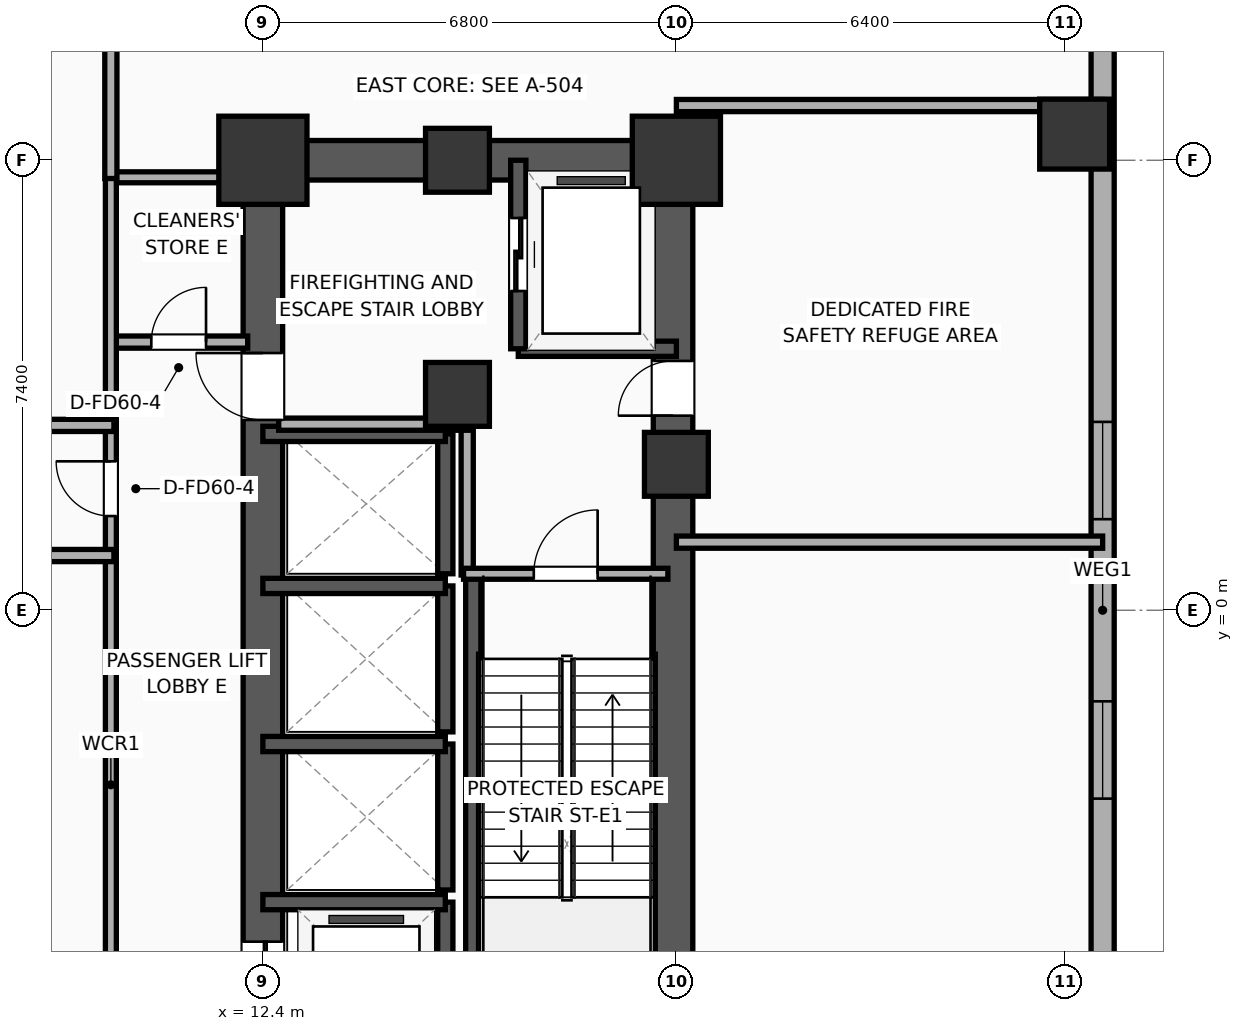
"""IFC4 building model, lengths in metres.
Left out: names, types, materials, properties, quantities, classifications, styles, units other than length and angle.
Written with IfcOpenShell. Run it as: python <this file> out.ifc"""

import sys

from ifc_helpers import new_model, si_unit, direction, frame, frame_2d, origin, origin_2d, place, context, subcontext, project, spatial, rectangle, hollow_rectangle, extrude, element, fill, save


model = new_model("IFC4")
c1 = context("Model", 3, precision=1e-05, world=origin(), true_north=direction((0.0, 1.0)))
c2 = subcontext(c1, "Body", "Model", "MODEL_VIEW")
j1 = project(units=[si_unit("LENGTHUNIT", "METRE"), si_unit("PLANEANGLEUNIT", "RADIAN")], contexts=[c1])
p1 = place(None, origin())
s1 = spatial("IfcSite", under=j1, at=p1, CompositionType="ELEMENT")
p2 = place(p1, origin())
s2 = spatial("IfcBuilding", under=s1, at=p2, CompositionType="ELEMENT")
p3 = place(p2, frame((0.0, 0.0, 80.6)))
s3 = spatial("IfcBuildingStorey", under=s2, at=p3, CompositionType="ELEMENT", Elevation=80.6)
p4 = place(p3, frame((15.6, 3.55, 0.0), z_axis=(0.0, 0.0, 1.0), x_axis=(1.0, 0.0, 0.0)))
e1 = element("IfcColumn", 1, at=p4, inside=s3, PredefinedType="COLUMN", context=c2, shape_type="SweptSolid", body=[
    extrude(rectangle(XDim=1.05, YDim=1.05, at=origin_2d()), origin(), (0.0, 0.0, 1.0), 5.2),
])
p5 = place(p3, frame((12.4, 7.4, 0.0), z_axis=(0.0, 0.0, 1.0), x_axis=(1.0, 0.0, 0.0)))
e2 = element("IfcColumn", 2, at=p5, inside=s3, PredefinedType="COLUMN", context=c2, shape_type="SweptSolid", body=[
    extrude(rectangle(XDim=1.45, YDim=1.45, at=origin_2d()), origin(), (0.0, 0.0, 1.0), 5.2),
])
for number, where, z_axis, x_axis in (
    (3, (15.6, 7.4, 0.0), (0.0, 0.0, 1.0), (1.0, 0.0, 0.0)),
    (4, (19.2, 2.4, 0.0), (0.0, 0.0, 1.0), (1.0, 0.0, 0.0)),
):
    element("IfcColumn", number, at=place(p3, frame(where, z_axis=z_axis, x_axis=x_axis)), inside=s3, PredefinedType="COLUMN", context=c2, shape_type="SweptSolid", body=[
        extrude(rectangle(XDim=1.05, YDim=1.05, at=origin_2d()), origin(), (0.0, 0.0, 1.0), 5.2),
    ])
p6 = place(p3, frame((19.2, 7.4, 0.0), z_axis=(0.0, 0.0, 1.0), x_axis=(1.0, 0.0, 0.0)))
e5 = element("IfcColumn", 5, at=p6, inside=s3, PredefinedType="COLUMN", context=c2, shape_type="SweptSolid", body=[
    extrude(rectangle(XDim=1.45, YDim=1.45, at=origin_2d()), origin(), (0.0, 0.0, 1.0), 5.2),
])
p7 = place(p3, frame((12.075, 7.4, 0.0), z_axis=(0.0, 0.0, 1.0), x_axis=(1.0, 0.0, 0.0)))
e6 = element("IfcWall", 6, at=p7, inside=s3, PredefinedType="SHEAR", context=c2, shape_type="SweptSolid", body=[
    extrude(rectangle(XDim=7.45, YDim=0.65, at=frame_2d((3.725, 0.0))), origin(), (0.0, 0.0, 1.0), 4.8),
])
p8 = place(p3, frame((12.4, -7.4, 0.0), z_axis=(0.0, 0.0, 1.0), x_axis=(0.0, 1.0, 0.0)))
e7 = element("IfcWall", 7, at=p8, inside=s3, PredefinedType="SHEAR", context=c2, shape_type="SweptSolid", body=[
    extrude(rectangle(XDim=14.8, YDim=0.65, at=frame_2d((7.4, 0.0))), origin(), (0.0, 0.0, 1.0), 4.8),
])
p9 = place(p8, frame((0.85, 0.0, 0.0)))
e8 = element("IfcOpeningElement", 8, at=p9, cuts=e7, PredefinedType="OPENING", context=c2, shape_type="SweptSolid", body=[
    extrude(rectangle(XDim=1.1, YDim=2.05, at=frame_2d((0.55, 1.025))), frame((0.0, 0.335, 0.0), z_axis=(0.0, -1.0, 0.0), x_axis=(1.0, 0.0, 0.0)), (0.0, 0.0, 1.0), 0.67),
])
p10 = place(p8, frame((10.53, 0.0, 0.0)))
e9 = element("IfcOpeningElement", 9, at=p10, cuts=e7, PredefinedType="OPENING", context=c2, shape_type="SweptSolid", body=[
    extrude(rectangle(XDim=1.1, YDim=2.05, at=frame_2d((0.55, 1.025))), frame((0.0, 0.335, 0.0), z_axis=(0.0, -1.0, 0.0), x_axis=(1.0, 0.0, 0.0)), (0.0, 0.0, 1.0), 0.67),
])
p11 = place(p3, frame((19.145, -7.4, 0.0), z_axis=(0.0, 0.0, 1.0), x_axis=(0.0, 1.0, 0.0)))
e10 = element("IfcWall", 10, at=p11, inside=s3, PredefinedType="SHEAR", context=c2, shape_type="SweptSolid", body=[
    extrude(rectangle(XDim=14.8, YDim=0.65, at=frame_2d((7.4, 0.0))), origin(), (0.0, 0.0, 1.0), 4.8),
])
p12 = place(p11, frame((10.6, 0.0, 0.0)))
e11 = element("IfcOpeningElement", 11, at=p12, cuts=e10, PredefinedType="OPENING", context=c2, shape_type="SweptSolid", body=[
    extrude(rectangle(XDim=0.9, YDim=2.05, at=frame_2d((0.45, 1.025))), frame((0.0, 0.335, 0.0), z_axis=(0.0, -1.0, 0.0), x_axis=(1.0, 0.0, 0.0)), (0.0, 0.0, 1.0), 0.67),
])
p13 = place(p3, frame((15.86, -7.085, 0.0), z_axis=(0.0, 0.0, 1.0), x_axis=(0.0, 1.0, 0.0)))
e12 = element("IfcWall", 12, at=p13, inside=s3, PredefinedType="SOLIDWALL", context=c2, shape_type="SweptSolid", body=[
    extrude(rectangle(XDim=7.685, YDim=0.25, at=frame_2d((3.843, 0.0))), origin(), (0.0, 0.0, 1.0), 4.8),
])
p14 = place(p3, frame((25.75, 7.83, 0.0), z_axis=(0.0, 0.0, 1.0), x_axis=(1.0, 0.0, 0.0)))
e13 = element("IfcColumn", 13, at=p14, inside=s3, PredefinedType="COLUMN", context=c2, shape_type="SweptSolid", body=[
    extrude(hollow_rectangle(XDim=1.15, YDim=1.15, WallThickness=0.04, at=origin_2d()), origin(), (0.0, 0.0, 1.0), 5.165),
])
p15 = place(p3, frame((26.21, 18.381, 0.0), z_axis=(0.0, 0.0, 1.0), x_axis=(0.0, -1.0, 0.0)))
e14 = element("IfcWall", 14, at=p15, inside=s3, PredefinedType="ELEMENTEDWALL", context=c2, shape_type="SweptSolid", body=[
    extrude(rectangle(XDim=36.763, YDim=0.38, at=frame_2d((18.381, 0.0))), origin(), (0.0, 0.0, 1.0), 3.69),
])
p16 = place(p15, frame((1.498, 0.0, 0.75)))
e15 = element("IfcOpeningElement", 15, at=p16, cuts=e14, PredefinedType="OPENING", context=c2, shape_type="SweptSolid", body=[
    extrude(rectangle(XDim=1.6, YDim=1.4, at=frame_2d((0.8, 0.7))), frame((0.0, 0.2, 0.0), z_axis=(0.0, -1.0, 0.0), x_axis=(1.0, 0.0, 0.0)), (0.0, 0.0, 1.0), 0.4),
])
p17 = place(p15, frame((6.093, 0.0, 0.75)))
e16 = element("IfcOpeningElement", 16, at=p17, cuts=e14, PredefinedType="OPENING", context=c2, shape_type="SweptSolid", body=[
    extrude(rectangle(XDim=1.6, YDim=1.4, at=frame_2d((0.8, 0.7))), frame((0.0, 0.2, 0.0), z_axis=(0.0, -1.0, 0.0), x_axis=(1.0, 0.0, 0.0)), (0.0, 0.0, 1.0), 0.4),
])
p18 = place(p15, frame((15.284, 0.0, 0.75)))
e17 = element("IfcOpeningElement", 17, at=p18, cuts=e14, PredefinedType="OPENING", context=c2, shape_type="SweptSolid", body=[
    extrude(rectangle(XDim=1.6, YDim=1.4, at=frame_2d((0.8, 0.7))), frame((0.0, 0.2, 0.0), z_axis=(0.0, -1.0, 0.0), x_axis=(1.0, 0.0, 0.0)), (0.0, 0.0, 1.0), 0.4),
])
p19 = place(p15, frame((19.879, 0.0, 0.75)))
e18 = element("IfcOpeningElement", 18, at=p19, cuts=e14, PredefinedType="OPENING", context=c2, shape_type="SweptSolid", body=[
    extrude(rectangle(XDim=1.6, YDim=1.4, at=frame_2d((0.8, 0.7))), frame((0.0, 0.2, 0.0), z_axis=(0.0, -1.0, 0.0), x_axis=(1.0, 0.0, 0.0)), (0.0, 0.0, 1.0), 0.4),
])
p20 = place(p15, frame((29.07, 0.0, 0.75)))
e19 = element("IfcOpeningElement", 19, at=p20, cuts=e14, PredefinedType="OPENING", context=c2, shape_type="SweptSolid", body=[
    extrude(rectangle(XDim=1.6, YDim=1.4, at=frame_2d((0.8, 0.7))), frame((0.0, 0.2, 0.0), z_axis=(0.0, -1.0, 0.0), x_axis=(1.0, 0.0, 0.0)), (0.0, 0.0, 1.0), 0.4),
])
p21 = place(p15, frame((33.665, 0.0, 0.75)))
e20 = element("IfcOpeningElement", 20, at=p21, cuts=e14, PredefinedType="OPENING", context=c2, shape_type="SweptSolid", body=[
    extrude(rectangle(XDim=1.6, YDim=1.4, at=frame_2d((0.8, 0.7))), frame((0.0, 0.2, 0.0), z_axis=(0.0, -1.0, 0.0), x_axis=(1.0, 0.0, 0.0)), (0.0, 0.0, 1.0), 0.4),
])
p22 = place(p3, frame((16.6, 4.3, 0.0), z_axis=(0.0, 0.0, 1.0), x_axis=(1.0, 0.0, 0.0)))
e21 = element("IfcWall", 21, at=p22, inside=s3, PredefinedType="SOLIDWALL", context=c2, shape_type="SweptSolid", body=[
    extrude(rectangle(XDim=2.6, YDim=0.25, at=frame_2d((1.3, 0.0))), origin(), (0.0, 0.0, 1.0), 4.8),
])
p23 = place(p3, frame((16.6, 7.4, 0.0), z_axis=(0.0, 0.0, 1.0), x_axis=(0.0, -1.0, 0.0)))
e22 = element("IfcWall", 22, at=p23, inside=s3, PredefinedType="SOLIDWALL", context=c2, shape_type="SweptSolid", body=[
    extrude(rectangle(XDim=3.1, YDim=0.25, at=frame_2d((1.55, 0.0))), origin(), (0.0, 0.0, 1.0), 4.8),
])
p24 = place(p23, frame((0.95, 0.0, 0.0)))
e23 = element("IfcOpeningElement", 23, at=p24, cuts=e22, PredefinedType="OPENING", context=c2, shape_type="SweptSolid", body=[
    extrude(rectangle(XDim=1.2, YDim=2.05, at=frame_2d((0.6, 1.025))), frame((0.0, 0.135, 0.0), z_axis=(0.0, -1.0, 0.0), x_axis=(1.0, 0.0, 0.0)), (0.0, 0.0, 1.0), 0.27),
])
p25 = place(p3, frame((15.4, -7.4, 0.0), z_axis=(0.0, 0.0, 1.0), x_axis=(0.0, 1.0, 0.0)))
e24 = element("IfcWall", 24, at=p25, inside=s3, PredefinedType="SOLIDWALL", context=c2, shape_type="SweptSolid", body=[
    extrude(rectangle(XDim=2.6, YDim=0.25, at=frame_2d((1.3, 0.0))), origin(), (0.0, 0.0, 1.0), 4.8),
])
p26 = place(p3, frame((15.4, -4.8, 0.0), z_axis=(0.0, 0.0, 1.0), x_axis=(-1.0, 0.0, 0.0)))
e25 = element("IfcWall", 25, at=p26, inside=s3, PredefinedType="SOLIDWALL", context=c2, shape_type="SweptSolid", body=[
    extrude(rectangle(XDim=3.0, YDim=0.25, at=frame_2d((1.5, 0.0))), origin(), (0.0, 0.0, 1.0), 4.8),
])
p27 = place(p3, frame((15.4, -4.6, 0.0), z_axis=(0.0, 0.0, 1.0), x_axis=(0.0, 1.0, 0.0)))
e26 = element("IfcWall", 26, at=p27, inside=s3, PredefinedType="SOLIDWALL", context=c2, shape_type="SweptSolid", body=[
    extrude(rectangle(XDim=2.4, YDim=0.25, at=frame_2d((1.2, 0.0))), origin(), (0.0, 0.0, 1.0), 4.8),
])
p28 = place(p3, frame((15.4, -2.2, 0.0), z_axis=(0.0, 0.0, 1.0), x_axis=(-1.0, 0.0, 0.0)))
e27 = element("IfcWall", 27, at=p28, inside=s3, PredefinedType="SOLIDWALL", context=c2, shape_type="SweptSolid", body=[
    extrude(rectangle(XDim=3.0, YDim=0.25, at=frame_2d((1.5, 0.0))), origin(), (0.0, 0.0, 1.0), 4.8),
])
p29 = place(p3, frame((15.4, -2.0, 0.0), z_axis=(0.0, 0.0, 1.0), x_axis=(0.0, 1.0, 0.0)))
e28 = element("IfcWall", 28, at=p29, inside=s3, PredefinedType="SOLIDWALL", context=c2, shape_type="SweptSolid", body=[
    extrude(rectangle(XDim=2.4, YDim=0.25, at=frame_2d((1.2, 0.0))), origin(), (0.0, 0.0, 1.0), 4.8),
])
p30 = place(p3, frame((15.4, 0.4, 0.0), z_axis=(0.0, 0.0, 1.0), x_axis=(-1.0, 0.0, 0.0)))
e29 = element("IfcWall", 29, at=p30, inside=s3, PredefinedType="SOLIDWALL", context=c2, shape_type="SweptSolid", body=[
    extrude(rectangle(XDim=3.0, YDim=0.25, at=frame_2d((1.5, 0.0))), origin(), (0.0, 0.0, 1.0), 4.8),
])
p31 = place(p3, frame((15.4, 0.6, 0.0), z_axis=(0.0, 0.0, 1.0), x_axis=(0.0, 1.0, 0.0)))
e30 = element("IfcWall", 30, at=p31, inside=s3, PredefinedType="SOLIDWALL", context=c2, shape_type="SweptSolid", body=[
    extrude(rectangle(XDim=2.3, YDim=0.25, at=frame_2d((1.15, 0.0))), origin(), (0.0, 0.0, 1.0), 4.8),
])
p32 = place(p3, frame((15.4, 2.9, 0.0), z_axis=(0.0, 0.0, 1.0), x_axis=(-1.0, 0.0, 0.0)))
e31 = element("IfcWall", 31, at=p32, inside=s3, PredefinedType="SOLIDWALL", context=c2, shape_type="SweptSolid", body=[
    extrude(rectangle(XDim=3.0, YDim=0.25, at=frame_2d((1.5, 0.0))), origin(), (0.0, 0.0, 1.0), 4.8),
])
p33 = place(p3, frame((15.76, 0.58, 0.0), z_axis=(0.0, 0.0, 1.0), x_axis=(0.0, 1.0, 0.0)))
e32 = element("IfcWall", 32, at=p33, inside=s3, PredefinedType="PARTITIONING", context=c2, shape_type="SweptSolid", body=[
    extrude(rectangle(XDim=2.52, YDim=0.2, at=frame_2d((1.26, 0.0))), origin(), (0.0, 0.0, 1.0), 4.8),
])
p34 = place(p3, frame((12.66, 3.06, 0.0), z_axis=(0.0, 0.0, 1.0), x_axis=(1.0, 0.0, 0.0)))
e33 = element("IfcWall", 33, at=p34, inside=s3, PredefinedType="PARTITIONING", context=c2, shape_type="SweptSolid", body=[
    extrude(rectangle(XDim=3.16, YDim=0.2, at=frame_2d((1.58, 0.0))), origin(), (0.0, 0.0, 1.0), 4.8),
])
p35 = place(p3, frame((15.7, 0.6, 0.0), z_axis=(0.0, 0.0, 1.0), x_axis=(1.0, 0.0, 0.0)))
e34 = element("IfcWall", 34, at=p35, inside=s3, PredefinedType="PARTITIONING", context=c2, shape_type="SweptSolid", body=[
    extrude(rectangle(XDim=3.36, YDim=0.18, at=frame_2d((1.68, 0.0))), origin(), (0.0, 0.0, 1.0), 4.8),
])
p36 = place(p35, frame((1.155, 0.0, 0.0)))
e35 = element("IfcOpeningElement", 35, at=p36, cuts=e34, PredefinedType="OPENING", context=c2, shape_type="SweptSolid", body=[
    extrude(rectangle(XDim=1.05, YDim=2.05, at=frame_2d((0.525, 1.025))), frame((0.0, 0.1, 0.0), z_axis=(0.0, -1.0, 0.0), x_axis=(1.0, 0.0, 0.0)), (0.0, 0.0, 1.0), 0.2),
])
p37 = place(p3, frame((9.88, 4.41, 0.0), z_axis=(0.0, 0.0, 1.0), x_axis=(1.0, 0.0, 0.0)))
e36 = element("IfcWall", 36, at=p37, inside=s3, PredefinedType="PARTITIONING", context=c2, shape_type="SweptSolid", body=[
    extrude(rectangle(XDim=2.27, YDim=0.2, at=frame_2d((1.135, 0.0))), origin(), (0.0, 0.0, 1.0), 4.8),
])
p38 = place(p37, frame((0.685, 0.0, 0.0)))
e37 = element("IfcOpeningElement", 37, at=p38, cuts=e36, PredefinedType="OPENING", context=c2, shape_type="SweptSolid", body=[
    extrude(rectangle(XDim=0.9, YDim=2.05, at=frame_2d((0.45, 1.025))), frame((0.0, 0.11, 0.0), z_axis=(0.0, -1.0, 0.0), x_axis=(1.0, 0.0, 0.0)), (0.0, 0.0, 1.0), 0.22),
])
p39 = place(p3, frame((9.88, 7.12, 0.0), z_axis=(0.0, 0.0, 1.0), x_axis=(1.0, 0.0, 0.0)))
e38 = element("IfcWall", 38, at=p39, inside=s3, PredefinedType="PARTITIONING", context=c2, shape_type="SweptSolid", body=[
    extrude(rectangle(XDim=2.27, YDim=0.18, at=frame_2d((1.135, 0.0))), origin(), (0.0, 0.0, 1.0), 3.84),
])
p40 = place(p3, frame((9.9, -7.14, 0.0), z_axis=(0.0, 0.0, 1.0), x_axis=(0.0, 1.0, 0.0)))
e39 = element("IfcWall", 39, at=p40, inside=s3, PredefinedType="PARTITIONING", context=c2, shape_type="SweptSolid", body=[
    extrude(rectangle(XDim=14.28, YDim=0.18, at=frame_2d((7.14, 0.0))), origin(), (0.0, 0.0, 1.0), 4.8),
])
p41 = place(p40, frame((8.689, 0.0, 0.0)))
e40 = element("IfcOpeningElement", 40, at=p41, cuts=e39, PredefinedType="OPENING", context=c2, shape_type="SweptSolid", body=[
    extrude(rectangle(XDim=0.9, YDim=2.05, at=frame_2d((0.45, 1.025))), frame((0.0, 0.1, 0.0), z_axis=(0.0, -1.0, 0.0), x_axis=(1.0, 0.0, 0.0)), (0.0, 0.0, 1.0), 0.2),
])
p42 = place(p3, frame((-9.95, 3.04, 0.0), z_axis=(0.0, 0.0, 1.0), x_axis=(1.0, 0.0, 0.0)))
e41 = element("IfcWall", 41, at=p42, inside=s3, PredefinedType="PARTITIONING", context=c2, shape_type="SweptSolid", body=[
    extrude(rectangle(XDim=19.9, YDim=0.2, at=frame_2d((9.95, 0.0))), origin(), (0.0, 0.0, 1.0), 4.8),
])
p43 = place(p42, frame((9.425, 0.0, 0.0)))
e42 = element("IfcOpeningElement", 42, at=p43, cuts=e41, PredefinedType="OPENING", context=c2, shape_type="SweptSolid", body=[
    extrude(rectangle(XDim=1.05, YDim=2.05, at=frame_2d((0.525, 1.025))), frame((0.0, 0.11, 0.0), z_axis=(0.0, -1.0, 0.0), x_axis=(1.0, 0.0, 0.0)), (0.0, 0.0, 1.0), 0.22),
])
p44 = place(p3, frame((-9.95, 0.9, 0.0), z_axis=(0.0, 0.0, 1.0), x_axis=(1.0, 0.0, 0.0)))
e43 = element("IfcWall", 43, at=p44, inside=s3, PredefinedType="PARTITIONING", context=c2, shape_type="SweptSolid", body=[
    extrude(rectangle(XDim=19.9, YDim=0.2, at=frame_2d((9.95, 0.0))), origin(), (0.0, 0.0, 1.0), 4.8),
])
p45 = place(p44, frame((9.425, 0.0, 0.0)))
e44 = element("IfcOpeningElement", 44, at=p45, cuts=e43, PredefinedType="OPENING", context=c2, shape_type="SweptSolid", body=[
    extrude(rectangle(XDim=1.05, YDim=2.05, at=frame_2d((0.525, 1.025))), frame((0.0, 0.11, 0.0), z_axis=(0.0, -1.0, 0.0), x_axis=(1.0, 0.0, 0.0)), (0.0, 0.0, 1.0), 0.22),
])
p46 = place(p3, frame((19.2, 1.12, 0.0), z_axis=(0.0, 0.0, 1.0), x_axis=(1.0, 0.0, 0.0)))
e45 = element("IfcWall", 45, at=p46, inside=s3, PredefinedType="PARTITIONING", context=c2, shape_type="SweptSolid", body=[
    extrude(rectangle(XDim=7.01, YDim=0.2, at=frame_2d((3.505, 0.0))), origin(), (0.0, 0.0, 1.0), 4.8),
])
p47 = place(p3, frame((19.2, 8.3, 0.0), z_axis=(0.0, 0.0, 1.0), x_axis=(1.0, 0.0, 0.0)))
e46 = element("IfcWall", 46, at=p47, inside=s3, PredefinedType="PARTITIONING", context=c2, shape_type="SweptSolid", body=[
    extrude(rectangle(XDim=7.01, YDim=0.2, at=frame_2d((3.505, 0.0))), origin(), (0.0, 0.0, 1.0), 3.69),
])
p48 = place(p3, frame((9.9, 7.1, 0.0), z_axis=(0.0, 0.0, 1.0), x_axis=(0.0, 1.0, 0.0)))
e47 = element("IfcWall", 47, at=p48, inside=s3, PredefinedType="PARTITIONING", context=c2, shape_type="SweptSolid", body=[
    extrude(rectangle(XDim=15.11, YDim=0.2, at=frame_2d((7.555, 0.0))), origin(), (0.0, 0.0, 1.0), 4.8),
])
p49 = place(p48, frame((8.239, 0.0, 0.0)))
e48 = element("IfcOpeningElement", 48, at=p49, cuts=e47, PredefinedType="OPENING", context=c2, shape_type="SweptSolid", body=[
    extrude(rectangle(XDim=1.05, YDim=2.05, at=frame_2d((0.525, 1.025))), frame((0.0, 0.11, 0.0), z_axis=(0.0, -1.0, 0.0), x_axis=(1.0, 0.0, 0.0)), (0.0, 0.0, 1.0), 0.22),
])
p50 = place(p18, origin())
e49 = element("IfcWindow", 49, at=p50, inside=s3, PartitioningType="SINGLE_PANEL", PredefinedType="WINDOW", context=c2, shape_type="SweptSolid", body=[
    extrude(rectangle(XDim=1.6, YDim=1.4, at=frame_2d((0.8, 0.7))), frame((0.0, 0.03, 0.0), z_axis=(0.0, -1.0, 0.0), x_axis=(1.0, 0.0, 0.0)), (0.0, 0.0, 1.0), 0.06),
])
fill(e17, e49)
p51 = place(p19, origin())
e50 = element("IfcWindow", 50, at=p51, inside=s3, PartitioningType="SINGLE_PANEL", PredefinedType="WINDOW", context=c2, shape_type="SweptSolid", body=[
    extrude(rectangle(XDim=1.6, YDim=1.4, at=frame_2d((0.8, 0.7))), frame((0.0, 0.03, 0.0), z_axis=(0.0, -1.0, 0.0), x_axis=(1.0, 0.0, 0.0)), (0.0, 0.0, 1.0), 0.06),
])
fill(e18, e50)
p52 = place(p24, origin())
e51 = element("IfcDoor", 51, at=p52, inside=s3, OperationType="SLIDING_TO_LEFT", PredefinedType="DOOR", context=c2, shape_type="SweptSolid", body=[
    extrude(rectangle(XDim=1.2, YDim=2.05, at=frame_2d((0.6, 1.025))), frame((0.0, 0.025, 0.0), z_axis=(0.0, -1.0, 0.0), x_axis=(1.0, 0.0, 0.0)), (0.0, 0.0, 1.0), 0.05),
])
fill(e23, e51)
p53 = place(p9, origin())
e52 = element("IfcDoor", 52, at=p53, inside=s3, OperationType="SLIDING_TO_LEFT", PredefinedType="DOOR", context=c2, shape_type="SweptSolid", body=[
    extrude(rectangle(XDim=1.1, YDim=2.05, at=frame_2d((0.55, 1.025))), frame((0.0, 0.025, 0.0), z_axis=(0.0, -1.0, 0.0), x_axis=(1.0, 0.0, 0.0)), (0.0, 0.0, 1.0), 0.05),
])
fill(e8, e52)
p54 = place(p36, origin())
e53 = element("IfcDoor", 53, at=p54, inside=s3, OperationType="SINGLE_SWING_RIGHT", PredefinedType="DOOR", context=c2, shape_type="SweptSolid", body=[
    extrude(rectangle(XDim=1.05, YDim=2.05, at=frame_2d((0.525, 1.025))), frame((0.0, 0.025, 0.0), z_axis=(0.0, -1.0, 0.0), x_axis=(1.0, 0.0, 0.0)), (0.0, 0.0, 1.0), 0.05),
])
fill(e35, e53)
p55 = place(p38, origin())
e54 = element("IfcDoor", 54, at=p55, inside=s3, OperationType="SINGLE_SWING_RIGHT", PredefinedType="DOOR", context=c2, shape_type="SweptSolid", body=[
    extrude(rectangle(XDim=0.9, YDim=2.05, at=frame_2d((0.45, 1.025))), frame((0.0, 0.025, 0.0), z_axis=(0.0, -1.0, 0.0), x_axis=(1.0, 0.0, 0.0)), (0.0, 0.0, 1.0), 0.05),
])
fill(e37, e54)
p56 = place(p41, origin())
e55 = element("IfcDoor", 55, at=p56, inside=s3, OperationType="SINGLE_SWING_RIGHT", PredefinedType="DOOR", context=c2, shape_type="SweptSolid", body=[
    extrude(rectangle(XDim=0.9, YDim=2.05, at=frame_2d((0.45, 1.025))), frame((0.0, 0.025, 0.0), z_axis=(0.0, -1.0, 0.0), x_axis=(1.0, 0.0, 0.0)), (0.0, 0.0, 1.0), 0.05),
])
fill(e40, e55)
p57 = place(p10, origin())
e56 = element("IfcDoor", 56, at=p57, inside=s3, OperationType="SINGLE_SWING_RIGHT", PredefinedType="DOOR", context=c2, shape_type="SweptSolid", body=[
    extrude(rectangle(XDim=1.1, YDim=2.05, at=frame_2d((0.55, 1.025))), frame((0.0, 0.025, 0.0), z_axis=(0.0, -1.0, 0.0), x_axis=(1.0, 0.0, 0.0)), (0.0, 0.0, 1.0), 0.05),
])
fill(e9, e56)
p58 = place(p12, origin())
e57 = element("IfcDoor", 57, at=p58, inside=s3, OperationType="SINGLE_SWING_LEFT", PredefinedType="DOOR", context=c2, shape_type="SweptSolid", body=[
    extrude(rectangle(XDim=0.9, YDim=2.05, at=frame_2d((0.45, 1.025))), frame((0.0, 0.025, 0.0), z_axis=(0.0, -1.0, 0.0), x_axis=(1.0, 0.0, 0.0)), (0.0, 0.0, 1.0), 0.05),
])
fill(e11, e57)
save(model, sys.argv[1])
